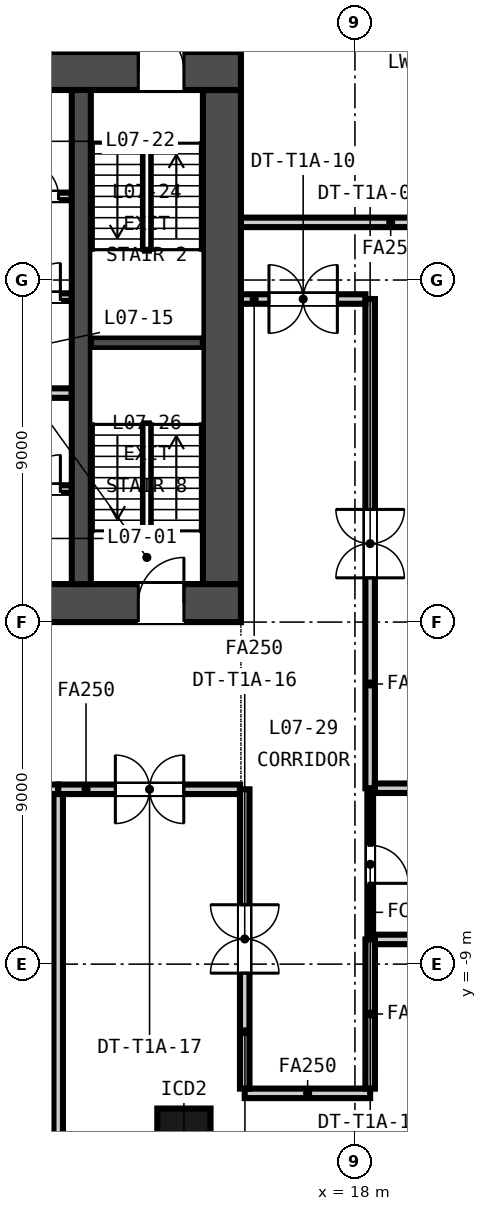
"""IFC4 building model, lengths in metres.
Left out: names, types, materials, properties, quantities, classifications, styles, units other than length and angle.
Written with IfcOpenShell. Run it as: python <this file> out.ifc"""

import sys

from ifc_helpers import new_model, si_unit, direction, frame, frame_2d, origin, origin_2d, place, context, subcontext, project, spatial, rectangle, extrude, element, fill, save


model = new_model("IFC4")
c1 = context("Model", 3, precision=1e-05, world=origin(), true_north=direction((0.0, 1.0)))
c2 = subcontext(c1, "Body", "Model", "MODEL_VIEW")
j1 = project(units=[si_unit("LENGTHUNIT", "METRE"), si_unit("PLANEANGLEUNIT", "RADIAN")], contexts=[c1])
p1 = place(None, origin())
s1 = spatial("IfcSite", under=j1, at=p1, CompositionType="ELEMENT")
p2 = place(p1, origin())
s2 = spatial("IfcBuilding", under=s1, at=p2, CompositionType="ELEMENT")
p3 = place(p2, frame((0.0, 0.0, 39.65)))
s3 = spatial("IfcBuildingStorey", under=s2, at=p3, CompositionType="ELEMENT", Elevation=39.65)
p4 = place(p3, frame((-15.0, 0.5, -0.15), z_axis=(0.0, 0.0, 1.0), x_axis=(1.0, 0.0, 0.0)))
e1 = element("IfcWall", 1, at=p4, inside=s3, PredefinedType="SOLIDWALL", context=c2, shape_type="SweptSolid", body=[
    extrude(rectangle(XDim=30.0, YDim=1.0, at=frame_2d((15.0, 0.0))), origin(), (0.0, 0.0, 1.0), 3.65),
])
p5 = place(p4, frame((5.8, 0.0, 0.15)))
e2 = element("IfcOpeningElement", 2, at=p5, cuts=e1, PredefinedType="OPENING", context=c2, shape_type="SweptSolid", body=[
    extrude(rectangle(XDim=2.4, YDim=2.4, at=frame_2d((1.2, 1.2))), frame((0.0, 0.51, 0.0), z_axis=(0.0, -1.0, 0.0), x_axis=(1.0, 0.0, 0.0)), (0.0, 0.0, 1.0), 1.02),
])
p6 = place(p4, frame((13.8, 0.0, 0.15)))
e3 = element("IfcOpeningElement", 3, at=p6, cuts=e1, PredefinedType="OPENING", context=c2, shape_type="SweptSolid", body=[
    extrude(rectangle(XDim=2.4, YDim=2.4, at=frame_2d((1.2, 1.2))), frame((0.0, 0.51, 0.0), z_axis=(0.0, -1.0, 0.0), x_axis=(1.0, 0.0, 0.0)), (0.0, 0.0, 1.0), 1.02),
])
p7 = place(p4, frame((21.8, 0.0, 0.15)))
e4 = element("IfcOpeningElement", 4, at=p7, cuts=e1, PredefinedType="OPENING", context=c2, shape_type="SweptSolid", body=[
    extrude(rectangle(XDim=2.4, YDim=2.4, at=frame_2d((1.2, 1.2))), frame((0.0, 0.51, 0.0), z_axis=(0.0, -1.0, 0.0), x_axis=(1.0, 0.0, 0.0)), (0.0, 0.0, 1.0), 1.02),
])
p8 = place(p4, frame((1.5, 0.0, 0.15)))
e5 = element("IfcOpeningElement", 5, at=p8, cuts=e1, PredefinedType="OPENING", context=c2, shape_type="SweptSolid", body=[
    extrude(rectangle(XDim=1.2, YDim=2.1, at=frame_2d((0.6, 1.05))), frame((0.0, 0.51, 0.0), z_axis=(0.0, -1.0, 0.0), x_axis=(1.0, 0.0, 0.0)), (0.0, 0.0, 1.0), 1.02),
])
p9 = place(p4, frame((27.3, 0.0, 0.15)))
e6 = element("IfcOpeningElement", 6, at=p9, cuts=e1, PredefinedType="OPENING", context=c2, shape_type="SweptSolid", body=[
    extrude(rectangle(XDim=1.2, YDim=2.1, at=frame_2d((0.6, 1.05))), frame((0.0, 0.51, 0.0), z_axis=(0.0, -1.0, 0.0), x_axis=(1.0, 0.0, 0.0)), (0.0, 0.0, 1.0), 1.02),
])
p10 = place(p3, frame((-15.0, 14.5, -0.15), z_axis=(0.0, 0.0, 1.0), x_axis=(1.0, 0.0, 0.0)))
e7 = element("IfcWall", 7, at=p10, inside=s3, PredefinedType="SOLIDWALL", context=c2, shape_type="SweptSolid", body=[
    extrude(rectangle(XDim=30.0, YDim=1.0, at=frame_2d((15.0, 0.0))), origin(), (0.0, 0.0, 1.0), 3.65),
])
p11 = place(p10, frame((9.25, 0.0, 0.15)))
e8 = element("IfcOpeningElement", 8, at=p11, cuts=e7, PredefinedType="OPENING", context=c2, shape_type="SweptSolid", body=[
    extrude(rectangle(XDim=1.5, YDim=2.1, at=frame_2d((0.75, 1.05))), frame((0.0, 0.51, 0.0), z_axis=(0.0, -1.0, 0.0), x_axis=(1.0, 0.0, 0.0)), (0.0, 0.0, 1.0), 1.02),
])
p12 = place(p10, frame((19.4, 0.0, 0.15)))
e9 = element("IfcOpeningElement", 9, at=p12, cuts=e7, PredefinedType="OPENING", context=c2, shape_type="SweptSolid", body=[
    extrude(rectangle(XDim=1.5, YDim=2.1, at=frame_2d((0.75, 1.05))), frame((0.0, 0.51, 0.0), z_axis=(0.0, -1.0, 0.0), x_axis=(1.0, 0.0, 0.0)), (0.0, 0.0, 1.0), 1.02),
])
p13 = place(p10, frame((1.5, 0.0, 0.15)))
e10 = element("IfcOpeningElement", 10, at=p13, cuts=e7, PredefinedType="OPENING", context=c2, shape_type="SweptSolid", body=[
    extrude(rectangle(XDim=1.2, YDim=2.1, at=frame_2d((0.6, 1.05))), frame((0.0, 0.51, 0.0), z_axis=(0.0, -1.0, 0.0), x_axis=(1.0, 0.0, 0.0)), (0.0, 0.0, 1.0), 1.02),
])
p14 = place(p10, frame((27.3, 0.0, 0.15)))
e11 = element("IfcOpeningElement", 11, at=p14, cuts=e7, PredefinedType="OPENING", context=c2, shape_type="SweptSolid", body=[
    extrude(rectangle(XDim=1.2, YDim=2.1, at=frame_2d((0.6, 1.05))), frame((0.0, 0.51, 0.0), z_axis=(0.0, -1.0, 0.0), x_axis=(1.0, 0.0, 0.0)), (0.0, 0.0, 1.0), 1.02),
])
p15 = place(p3, frame((14.5, 1.0, -0.15), z_axis=(0.0, 0.0, 1.0), x_axis=(0.0, 1.0, 0.0)))
e12 = element("IfcWall", 12, at=p15, inside=s3, PredefinedType="SOLIDWALL", context=c2, shape_type="SweptSolid", body=[
    extrude(rectangle(XDim=13.0, YDim=1.0, at=frame_2d((6.5, 0.0))), origin(), (0.0, 0.0, 1.0), 3.65),
])
p16 = place(p3, frame((10.8, 1.0, -0.15), z_axis=(0.0, 0.0, 1.0), x_axis=(0.0, 1.0, 0.0)))
e13 = element("IfcWall", 13, at=p16, inside=s3, PredefinedType="SOLIDWALL", context=c2, shape_type="SweptSolid", body=[
    extrude(rectangle(XDim=13.0, YDim=0.5, at=frame_2d((6.5, 0.0))), origin(), (0.0, 0.0, 1.0), 3.65),
])
p17 = place(p3, frame((13.5, -13.5, -0.15), z_axis=(0.0, 0.0, 1.0), x_axis=(1.0, 0.0, 0.0)))
e14 = element("IfcColumn", 14, at=p17, inside=s3, PredefinedType="COLUMN", context=c2, shape_type="SweptSolid", body=[
    extrude(rectangle(XDim=1.4, YDim=1.4, at=origin_2d()), origin(), (0.0, 0.0, 1.0), 3.65),
])
p18 = place(p3, frame((-10.55, 3.5, 0.0), z_axis=(0.0, 0.0, 1.0), x_axis=(1.0, 0.0, 0.0)))
e15 = element("IfcWall", 15, at=p18, inside=s3, PredefinedType="PARTITIONING", context=c2, shape_type="SweptSolid", body=[
    extrude(rectangle(XDim=21.1, YDim=0.2, at=frame_2d((10.55, 0.0))), origin(), (0.0, 0.0, 1.0), 3.5),
])
p19 = place(p18, frame((0.675, 0.0, 0.0)))
e16 = element("IfcOpeningElement", 16, at=p19, cuts=e15, PredefinedType="OPENING", context=c2, shape_type="SweptSolid", body=[
    extrude(rectangle(XDim=1.2, YDim=2.1, at=frame_2d((0.6, 1.05))), frame((0.0, 0.11, 0.0), z_axis=(0.0, -1.0, 0.0), x_axis=(1.0, 0.0, 0.0)), (0.0, 0.0, 1.0), 0.22),
])
p20 = place(p18, frame((3.475, 0.0, 0.0)))
e17 = element("IfcOpeningElement", 17, at=p20, cuts=e15, PredefinedType="OPENING", context=c2, shape_type="SweptSolid", body=[
    extrude(rectangle(XDim=1.2, YDim=2.1, at=frame_2d((0.6, 1.05))), frame((0.0, 0.11, 0.0), z_axis=(0.0, -1.0, 0.0), x_axis=(1.0, 0.0, 0.0)), (0.0, 0.0, 1.0), 0.22),
])
p21 = place(p18, frame((6.275, 0.0, 0.0)))
e18 = element("IfcOpeningElement", 18, at=p21, cuts=e15, PredefinedType="OPENING", context=c2, shape_type="SweptSolid", body=[
    extrude(rectangle(XDim=1.2, YDim=2.1, at=frame_2d((0.6, 1.05))), frame((0.0, 0.11, 0.0), z_axis=(0.0, -1.0, 0.0), x_axis=(1.0, 0.0, 0.0)), (0.0, 0.0, 1.0), 0.22),
])
p22 = place(p18, frame((9.075, 0.0, 0.0)))
e19 = element("IfcOpeningElement", 19, at=p22, cuts=e15, PredefinedType="OPENING", context=c2, shape_type="SweptSolid", body=[
    extrude(rectangle(XDim=1.2, YDim=2.1, at=frame_2d((0.6, 1.05))), frame((0.0, 0.11, 0.0), z_axis=(0.0, -1.0, 0.0), x_axis=(1.0, 0.0, 0.0)), (0.0, 0.0, 1.0), 0.22),
])
p23 = place(p18, frame((11.875, 0.0, 0.0)))
e20 = element("IfcOpeningElement", 20, at=p23, cuts=e15, PredefinedType="OPENING", context=c2, shape_type="SweptSolid", body=[
    extrude(rectangle(XDim=1.2, YDim=2.1, at=frame_2d((0.6, 1.05))), frame((0.0, 0.11, 0.0), z_axis=(0.0, -1.0, 0.0), x_axis=(1.0, 0.0, 0.0)), (0.0, 0.0, 1.0), 0.22),
])
p24 = place(p18, frame((14.675, 0.0, 0.0)))
e21 = element("IfcOpeningElement", 21, at=p24, cuts=e15, PredefinedType="OPENING", context=c2, shape_type="SweptSolid", body=[
    extrude(rectangle(XDim=1.2, YDim=2.1, at=frame_2d((0.6, 1.05))), frame((0.0, 0.11, 0.0), z_axis=(0.0, -1.0, 0.0), x_axis=(1.0, 0.0, 0.0)), (0.0, 0.0, 1.0), 0.22),
])
p25 = place(p18, frame((17.475, 0.0, 0.0)))
e22 = element("IfcOpeningElement", 22, at=p25, cuts=e15, PredefinedType="OPENING", context=c2, shape_type="SweptSolid", body=[
    extrude(rectangle(XDim=1.2, YDim=2.1, at=frame_2d((0.6, 1.05))), frame((0.0, 0.11, 0.0), z_axis=(0.0, -1.0, 0.0), x_axis=(1.0, 0.0, 0.0)), (0.0, 0.0, 1.0), 0.22),
])
p26 = place(p18, frame((19.9, 0.0, 0.0)))
e23 = element("IfcOpeningElement", 23, at=p26, cuts=e15, PredefinedType="OPENING", context=c2, shape_type="SweptSolid", body=[
    extrude(rectangle(XDim=0.9, YDim=2.1, at=frame_2d((0.45, 1.05))), frame((0.0, 0.11, 0.0), z_axis=(0.0, -1.0, 0.0), x_axis=(1.0, 0.0, 0.0)), (0.0, 0.0, 1.0), 0.22),
])
p27 = place(p3, frame((-10.55, 6.025, 0.0), z_axis=(0.0, 0.0, 1.0), x_axis=(1.0, 0.0, 0.0)))
e24 = element("IfcWall", 24, at=p27, inside=s3, PredefinedType="PARTITIONING", context=c2, shape_type="SweptSolid", body=[
    extrude(rectangle(XDim=21.1, YDim=0.25, at=frame_2d((10.55, 0.0))), origin(), (0.0, 0.0, 1.0), 3.5),
])
p28 = place(p3, frame((-4.125, 8.55, 0.0), z_axis=(0.0, 0.0, 1.0), x_axis=(1.0, 0.0, 0.0)))
e25 = element("IfcWall", 25, at=p28, inside=s3, PredefinedType="PARTITIONING", context=c2, shape_type="SweptSolid", body=[
    extrude(rectangle(XDim=14.675, YDim=0.2, at=frame_2d((7.337, 0.0))), origin(), (0.0, 0.0, 1.0), 3.5),
])
p29 = place(p28, frame((2.438, 0.0, 0.0)))
e26 = element("IfcOpeningElement", 26, at=p29, cuts=e25, PredefinedType="OPENING", context=c2, shape_type="SweptSolid", body=[
    extrude(rectangle(XDim=1.0, YDim=2.1, at=frame_2d((0.5, 1.05))), frame((0.0, 0.11, 0.0), z_axis=(0.0, -1.0, 0.0), x_axis=(1.0, 0.0, 0.0)), (0.0, 0.0, 1.0), 0.22),
])
p30 = place(p28, frame((6.775, 0.0, 0.0)))
e27 = element("IfcOpeningElement", 27, at=p30, cuts=e25, PredefinedType="OPENING", context=c2, shape_type="SweptSolid", body=[
    extrude(rectangle(XDim=1.0, YDim=2.1, at=frame_2d((0.5, 1.05))), frame((0.0, 0.11, 0.0), z_axis=(0.0, -1.0, 0.0), x_axis=(1.0, 0.0, 0.0)), (0.0, 0.0, 1.0), 0.22),
])
p31 = place(p28, frame((10.363, 0.0, 0.0)))
e28 = element("IfcOpeningElement", 28, at=p31, cuts=e25, PredefinedType="OPENING", context=c2, shape_type="SweptSolid", body=[
    extrude(rectangle(XDim=1.0, YDim=2.1, at=frame_2d((0.5, 1.05))), frame((0.0, 0.11, 0.0), z_axis=(0.0, -1.0, 0.0), x_axis=(1.0, 0.0, 0.0)), (0.0, 0.0, 1.0), 0.22),
])
p32 = place(p28, frame((13.475, 0.0, 0.0)))
e29 = element("IfcOpeningElement", 29, at=p32, cuts=e25, PredefinedType="OPENING", context=c2, shape_type="SweptSolid", body=[
    extrude(rectangle(XDim=0.9, YDim=2.1, at=frame_2d((0.45, 1.05))), frame((0.0, 0.11, 0.0), z_axis=(0.0, -1.0, 0.0), x_axis=(1.0, 0.0, 0.0)), (0.0, 0.0, 1.0), 0.22),
])
p33 = place(p3, frame((5.9, 11.2, 0.0), z_axis=(0.0, 0.0, 1.0), x_axis=(1.0, 0.0, 0.0)))
e30 = element("IfcWall", 30, at=p33, inside=s3, PredefinedType="PARTITIONING", context=c2, shape_type="SweptSolid", body=[
    extrude(rectangle(XDim=4.65, YDim=0.2, at=frame_2d((2.325, 0.0))), origin(), (0.0, 0.0, 1.0), 3.5),
])
p34 = place(p33, frame((3.4, 0.0, 0.0)))
e31 = element("IfcOpeningElement", 31, at=p34, cuts=e30, PredefinedType="OPENING", context=c2, shape_type="SweptSolid", body=[
    extrude(rectangle(XDim=0.9, YDim=2.1, at=frame_2d((0.45, 1.05))), frame((0.0, 0.11, 0.0), z_axis=(0.0, -1.0, 0.0), x_axis=(1.0, 0.0, 0.0)), (0.0, 0.0, 1.0), 0.22),
])
p35 = place(p3, frame((11.05, 7.35, -0.15), z_axis=(0.0, 0.0, 1.0), x_axis=(1.0, 0.0, 0.0)))
e32 = element("IfcWall", 32, at=p35, inside=s3, PredefinedType="SOLIDWALL", context=c2, shape_type="SweptSolid", body=[
    extrude(rectangle(XDim=2.95, YDim=0.3, at=frame_2d((1.475, 0.0))), origin(), (0.0, 0.0, 1.0), 3.65),
])
p36 = place(p3, frame((10.192, -4.4, 0.0), z_axis=(0.0, 0.0, 1.0), x_axis=(-1.0, 0.0, 0.0)))
e33 = element("IfcWall", 33, at=p36, inside=s3, PredefinedType="PARTITIONING", context=c2, shape_type="SweptSolid", body=[
    extrude(rectangle(XDim=25.167, YDim=0.25, at=frame_2d((12.583, 0.0))), origin(), (0.0, 0.0, 1.0), 2.741),
])
p37 = place(p36, frame((11.696, 0.0, 0.0)))
e34 = element("IfcOpeningElement", 34, at=p37, cuts=e33, PredefinedType="OPENING", context=c2, shape_type="SweptSolid", body=[
    extrude(rectangle(XDim=1.8, YDim=2.1, at=frame_2d((0.9, 1.05))), frame((0.0, 0.135, 0.0), z_axis=(0.0, -1.0, 0.0), x_axis=(1.0, 0.0, 0.0)), (0.0, 0.0, 1.0), 0.27),
])
p38 = place(p3, frame((14.975, -4.4, 0.0), z_axis=(0.0, 0.0, 1.0), x_axis=(-1.0, 0.0, 0.0)))
e35 = element("IfcWall", 35, at=p38, inside=s3, PredefinedType="PARTITIONING", context=c2, shape_type="SweptSolid", body=[
    extrude(rectangle(XDim=4.783, YDim=0.25, at=frame_2d((2.392, 0.0))), origin(), (0.0, 0.0, 1.0), 2.741),
])
p39 = place(p38, frame((1.479, 0.0, 0.0)))
e36 = element("IfcOpeningElement", 36, at=p39, cuts=e35, PredefinedType="OPENING", context=c2, shape_type="SweptSolid", body=[
    extrude(rectangle(XDim=1.8, YDim=2.1, at=frame_2d((0.9, 1.05))), frame((0.0, 0.135, 0.0), z_axis=(0.0, -1.0, 0.0), x_axis=(1.0, 0.0, 0.0)), (0.0, 0.0, 1.0), 0.27),
])
p40 = place(p3, frame((18.4, 8.5, 0.0), z_axis=(0.0, 0.0, 1.0), x_axis=(0.0, -1.0, 0.0)))
e37 = element("IfcWall", 37, at=p40, inside=s3, PredefinedType="PARTITIONING", context=c2, shape_type="SweptSolid", body=[
    extrude(rectangle(XDim=12.872, YDim=0.25, at=frame_2d((6.436, 0.0))), origin(), (0.0, 0.0, 1.0), 2.741),
])
p41 = place(p40, frame((5.536, 0.0, 0.0)))
e38 = element("IfcOpeningElement", 38, at=p41, cuts=e37, PredefinedType="OPENING", context=c2, shape_type="SweptSolid", body=[
    extrude(rectangle(XDim=1.8, YDim=2.1, at=frame_2d((0.9, 1.05))), frame((0.0, 0.135, 0.0), z_axis=(0.0, -1.0, 0.0), x_axis=(1.0, 0.0, 0.0)), (0.0, 0.0, 1.0), 0.27),
])
p42 = place(p3, frame((18.402, -4.398, 0.0), z_axis=(0.0, 0.0, 1.0), x_axis=(0.0, -1.0, 0.0)))
e39 = element("IfcWall", 39, at=p42, inside=s3, PredefinedType="PARTITIONING", context=c2, shape_type="SweptSolid", body=[
    extrude(rectangle(XDim=3.952, YDim=0.15, at=frame_2d((1.976, 0.0))), origin(), (0.0, 0.0, 1.0), 2.741),
])
p43 = place(p42, frame((1.476, 0.0, 0.0)))
e40 = element("IfcOpeningElement", 40, at=p43, cuts=e39, PredefinedType="OPENING", context=c2, shape_type="SweptSolid", body=[
    extrude(rectangle(XDim=1.0, YDim=2.1, at=frame_2d((0.5, 1.05))), frame((0.0, 0.085, 0.0), z_axis=(0.0, -1.0, 0.0), x_axis=(1.0, 0.0, 0.0)), (0.0, 0.0, 1.0), 0.17),
])
p44 = place(p3, frame((18.4, -12.4, 0.0), z_axis=(0.0, 0.0, 1.0), x_axis=(-1.0, 0.0, 0.0)))
e41 = element("IfcWall", 41, at=p44, inside=s3, PredefinedType="PARTITIONING", context=c2, shape_type="SweptSolid", body=[
    extrude(rectangle(XDim=3.3, YDim=0.25, at=frame_2d((1.65, 0.0))), origin(), (0.0, 0.0, 1.0), 2.741),
])
p45 = place(p3, frame((18.402, -8.35, 0.0), z_axis=(0.0, 0.0, 1.0), x_axis=(-0.000497636166, -0.999999876179, 0.0)))
e42 = element("IfcWall", 42, at=p45, inside=s3, PredefinedType="PARTITIONING", context=c2, shape_type="SweptSolid", body=[
    extrude(rectangle(XDim=3.925, YDim=0.25, at=frame_2d((1.962, 0.0))), origin(), (0.0, 0.0, 1.0), 2.741),
])
p46 = place(p3, frame((15.0, 10.517, 0.0), z_axis=(0.0, 0.0, 1.0), x_axis=(1.0, 0.0, 0.0)))
e43 = element("IfcWall", 43, at=p46, inside=s3, PredefinedType="PARTITIONING", context=c2, shape_type="SweptSolid", body=[
    extrude(rectangle(XDim=16.842, YDim=0.25, at=frame_2d((8.421, 0.0))), origin(), (0.0, 0.0, 1.0), 2.741),
])
p47 = place(p46, frame((7.921, 0.0, 0.0)))
e44 = element("IfcOpeningElement", 44, at=p47, cuts=e43, PredefinedType="OPENING", context=c2, shape_type="SweptSolid", body=[
    extrude(rectangle(XDim=1.0, YDim=2.1, at=frame_2d((0.5, 1.05))), frame((0.0, 0.135, 0.0), z_axis=(0.0, -1.0, 0.0), x_axis=(1.0, 0.0, 0.0)), (0.0, 0.0, 1.0), 0.27),
])
p48 = place(p3, frame((15.0, 8.5, 0.0), z_axis=(0.0, 0.0, 1.0), x_axis=(1.0, 0.0, 0.0)))
e45 = element("IfcWall", 45, at=p48, inside=s3, PredefinedType="PARTITIONING", context=c2, shape_type="SweptSolid", body=[
    extrude(rectangle(XDim=3.275, YDim=0.25, at=frame_2d((1.637, 0.0))), origin(), (0.0, 0.0, 1.0), 2.741),
])
p49 = place(p48, frame((0.738, 0.0, 0.0)))
e46 = element("IfcOpeningElement", 46, at=p49, cuts=e45, PredefinedType="OPENING", context=c2, shape_type="SweptSolid", body=[
    extrude(rectangle(XDim=1.8, YDim=2.1, at=frame_2d((0.9, 1.05))), frame((0.0, 0.135, 0.0), z_axis=(0.0, -1.0, 0.0), x_axis=(1.0, 0.0, 0.0)), (0.0, 0.0, 1.0), 0.27),
])
p50 = place(p3, frame((18.525, -4.372, 0.0), z_axis=(0.0, 0.0, 1.0), x_axis=(1.0, 0.0, 0.0)))
e47 = element("IfcWall", 47, at=p50, inside=s3, PredefinedType="PARTITIONING", context=c2, shape_type="SweptSolid", body=[
    extrude(rectangle(XDim=15.208, YDim=0.25, at=frame_2d((7.604, 0.0))), origin(), (0.0, 0.0, 1.0), 2.741),
])
p51 = place(p3, frame((18.527, -8.35, 0.0), z_axis=(0.0, 0.0, 1.0), x_axis=(1.0, 0.0, 0.0)))
e48 = element("IfcWall", 48, at=p51, inside=s3, PredefinedType="PARTITIONING", context=c2, shape_type="SweptSolid", body=[
    extrude(rectangle(XDim=12.91, YDim=0.25, at=frame_2d((6.455, 0.0))), origin(), (0.0, 0.0, 1.0), 2.741),
])
p52 = place(p3, frame((10.192, -29.22, 0.0), z_axis=(0.0, 0.0, 1.0), x_axis=(0.0, 1.0, 0.0)))
e49 = element("IfcWall", 49, at=p52, inside=s3, PredefinedType="PARTITIONING", context=c2, shape_type="SweptSolid", body=[
    extrude(rectangle(XDim=24.695, YDim=0.25, at=frame_2d((12.348, 0.0))), origin(), (0.0, 0.0, 1.0), 2.741),
])
p53 = place(p3, frame((15.1, -12.275, 0.0), z_axis=(0.0, 0.0, 1.0), x_axis=(0.0, 1.0, 0.0)))
e50 = element("IfcWall", 50, at=p53, inside=s3, PredefinedType="PARTITIONING", context=c2, shape_type="SweptSolid", body=[
    extrude(rectangle(XDim=7.875, YDim=0.25, at=frame_2d((3.938, 0.0))), origin(), (0.0, 0.0, 1.0), 2.741),
])
p54 = place(p53, frame((3.038, 0.0, 0.0)))
e51 = element("IfcOpeningElement", 51, at=p54, cuts=e50, PredefinedType="OPENING", context=c2, shape_type="SweptSolid", body=[
    extrude(rectangle(XDim=1.8, YDim=2.1, at=frame_2d((0.9, 1.05))), frame((0.0, 0.135, 0.0), z_axis=(0.0, -1.0, 0.0), x_axis=(1.0, 0.0, 0.0)), (0.0, 0.0, 1.0), 0.27),
])
p55 = place(p26, origin())
e52 = element("IfcDoor", 52, at=p55, inside=s3, OperationType="SINGLE_SWING_RIGHT", PredefinedType="DOOR", context=c2, shape_type="SweptSolid", body=[
    extrude(rectangle(XDim=0.9, YDim=2.1, at=frame_2d((0.45, 1.05))), frame((0.0, 0.025, 0.0), z_axis=(0.0, -1.0, 0.0), x_axis=(1.0, 0.0, 0.0)), (0.0, 0.0, 1.0), 0.05),
])
fill(e23, e52)
p56 = place(p32, origin())
e53 = element("IfcDoor", 53, at=p56, inside=s3, OperationType="SINGLE_SWING_RIGHT", PredefinedType="DOOR", context=c2, shape_type="SweptSolid", body=[
    extrude(rectangle(XDim=0.9, YDim=2.1, at=frame_2d((0.45, 1.05))), frame((0.0, 0.025, 0.0), z_axis=(0.0, -1.0, 0.0), x_axis=(1.0, 0.0, 0.0)), (0.0, 0.0, 1.0), 0.05),
])
fill(e29, e53)
p57 = place(p34, origin())
e54 = element("IfcDoor", 54, at=p57, inside=s3, OperationType="SINGLE_SWING_LEFT", PredefinedType="DOOR", context=c2, shape_type="SweptSolid", body=[
    extrude(rectangle(XDim=0.9, YDim=2.1, at=frame_2d((0.45, 1.05))), frame((0.0, 0.025, 0.0), z_axis=(0.0, -1.0, 0.0), x_axis=(1.0, 0.0, 0.0)), (0.0, 0.0, 1.0), 0.05),
])
fill(e31, e54)
p58 = place(p14, origin())
e55 = element("IfcDoor", 55, at=p58, inside=s3, OperationType="SINGLE_SWING_LEFT", PredefinedType="DOOR", context=c2, shape_type="SweptSolid", body=[
    extrude(rectangle(XDim=1.2, YDim=2.1, at=frame_2d((0.6, 1.05))), frame((0.0, 0.025, 0.0), z_axis=(0.0, -1.0, 0.0), x_axis=(1.0, 0.0, 0.0)), (0.0, 0.0, 1.0), 0.05),
])
fill(e11, e55)
p59 = place(p9, origin())
e56 = element("IfcDoor", 56, at=p59, inside=s3, OperationType="SINGLE_SWING_RIGHT", PredefinedType="DOOR", context=c2, shape_type="SweptSolid", body=[
    extrude(rectangle(XDim=1.2, YDim=2.1, at=frame_2d((0.6, 1.05))), frame((0.0, 0.025, 0.0), z_axis=(0.0, -1.0, 0.0), x_axis=(1.0, 0.0, 0.0)), (0.0, 0.0, 1.0), 0.05),
])
fill(e6, e56)
p60 = place(p41, origin())
e57 = element("IfcDoor", 57, at=p60, inside=s3, OperationType="DOUBLE_DOOR_DOUBLE_SWING", PredefinedType="DOOR", context=c2, shape_type="SweptSolid", body=[
    extrude(rectangle(XDim=1.8, YDim=2.1, at=frame_2d((0.9, 1.05))), frame((0.0, 0.025, 0.0), z_axis=(0.0, -1.0, 0.0), x_axis=(1.0, 0.0, 0.0)), (0.0, 0.0, 1.0), 0.05),
])
fill(e38, e57)
p61 = place(p49, origin())
e58 = element("IfcDoor", 58, at=p61, inside=s3, OperationType="DOUBLE_DOOR_DOUBLE_SWING", PredefinedType="DOOR", context=c2, shape_type="SweptSolid", body=[
    extrude(rectangle(XDim=1.8, YDim=2.1, at=frame_2d((0.9, 1.05))), frame((0.0, 0.025, 0.0), z_axis=(0.0, -1.0, 0.0), x_axis=(1.0, 0.0, 0.0)), (0.0, 0.0, 1.0), 0.05),
])
fill(e46, e58)
p62 = place(p43, origin())
e59 = element("IfcDoor", 59, at=p62, inside=s3, OperationType="SINGLE_SWING_RIGHT", PredefinedType="DOOR", context=c2, shape_type="SweptSolid", body=[
    extrude(rectangle(XDim=1.0, YDim=2.1, at=frame_2d((0.5, 1.05))), frame((0.0, 0.025, 0.0), z_axis=(0.0, -1.0, 0.0), x_axis=(1.0, 0.0, 0.0)), (0.0, 0.0, 1.0), 0.05),
])
fill(e40, e59)
p63 = place(p54, origin())
e60 = element("IfcDoor", 60, at=p63, inside=s3, OperationType="DOUBLE_DOOR_DOUBLE_SWING", PredefinedType="DOOR", context=c2, shape_type="SweptSolid", body=[
    extrude(rectangle(XDim=1.8, YDim=2.1, at=frame_2d((0.9, 1.05))), frame((0.0, 0.025, 0.0), z_axis=(0.0, -1.0, 0.0), x_axis=(1.0, 0.0, 0.0)), (0.0, 0.0, 1.0), 0.05),
])
fill(e51, e60)
p64 = place(p39, origin())
e61 = element("IfcDoor", 61, at=p64, inside=s3, OperationType="DOUBLE_DOOR_DOUBLE_SWING", PredefinedType="DOOR", context=c2, shape_type="SweptSolid", body=[
    extrude(rectangle(XDim=1.8, YDim=2.1, at=frame_2d((0.9, 1.05))), frame((0.0, 0.025, 0.0), z_axis=(0.0, -1.0, 0.0), x_axis=(1.0, 0.0, 0.0)), (0.0, 0.0, 1.0), 0.05),
])
fill(e36, e61)
save(model, sys.argv[1])
